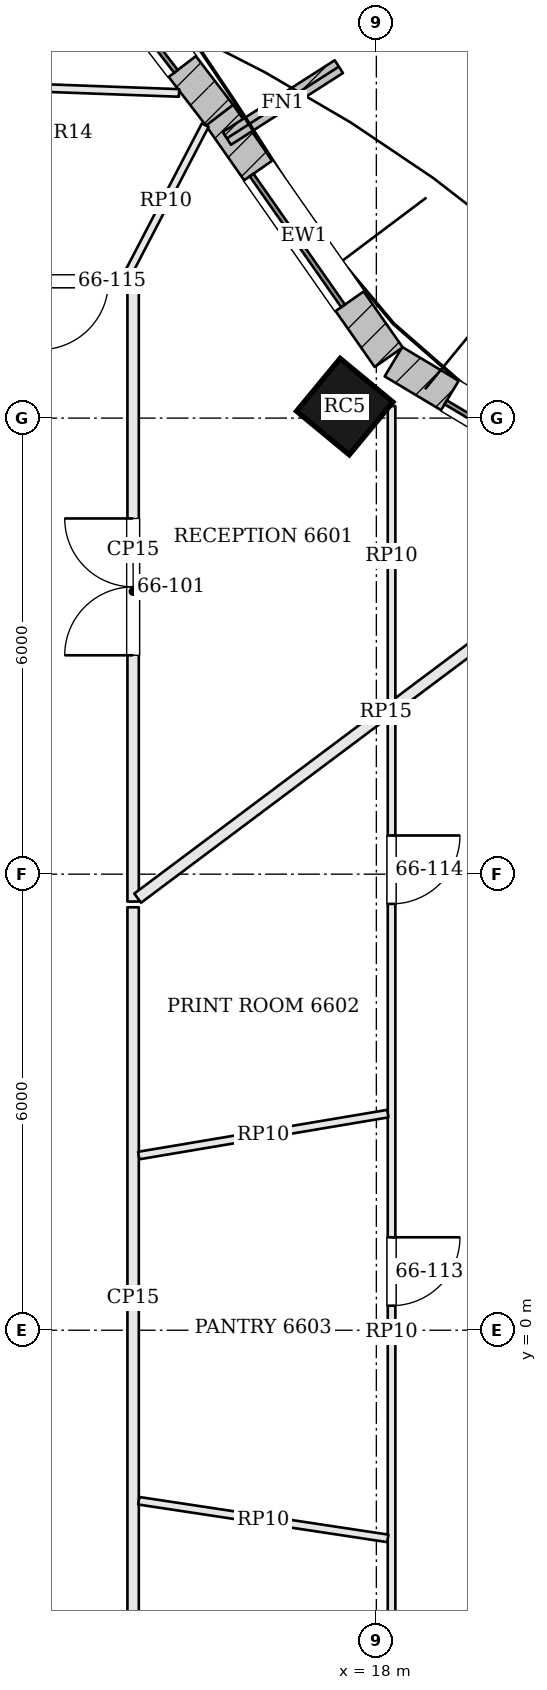
"""IFC4 building model, lengths in metres.
Left out: names, types, materials, properties, quantities, classifications, styles, units other than length and angle.
Written with IfcOpenShell. Run it as: python <this file> out.ifc"""

import sys

from ifc_helpers import new_model, si_unit, direction, frame, frame_2d, origin, origin_2d, place, context, subcontext, project, spatial, rectangle, extrude, element, fill, save


model = new_model("IFC4")
c1 = context("Model", 3, precision=1e-05, world=origin(), true_north=direction((0.0, 1.0)))
c2 = subcontext(c1, "Body", "Model", "MODEL_VIEW")
j1 = project(units=[si_unit("LENGTHUNIT", "METRE"), si_unit("PLANEANGLEUNIT", "RADIAN")], contexts=[c1])
p1 = place(None, origin())
s1 = spatial("IfcSite", under=j1, at=p1, CompositionType="ELEMENT")
p2 = place(p1, origin())
s2 = spatial("IfcBuilding", under=s1, at=p2, CompositionType="ELEMENT")
p3 = place(p2, frame((0.0, 0.0, 268.8)))
s3 = spatial("IfcBuildingStorey", under=s2, at=p3, CompositionType="ELEMENT", Elevation=268.8)
p4 = place(p3, frame((17.584, 12.151, -0.7), z_axis=(0.0, 0.0, 1.0), x_axis=(-0.770679191336, 0.637223339216, 0.0)))
e1 = element("IfcColumn", 1, at=p4, inside=s3, PredefinedType="COLUMN", context=c2, shape_type="SweptSolid", body=[
    extrude(rectangle(XDim=0.9, YDim=0.9, at=origin_2d()), origin(), (0.0, 0.0, 1.0), 4.6),
])
p5 = place(p3, frame((21.51, 10.774, 0.0), z_axis=(0.0, 0.0, 1.0), x_axis=(-0.857920147813, 0.513783047576, 0.0)))
e2 = element("IfcWall", 2, at=p5, inside=s3, PredefinedType="SOLIDWALL", context=c2, shape_type="SweptSolid", body=[
    extrude(rectangle(XDim=3.83, YDim=0.45, at=frame_2d((1.915, 0.0))), origin(), (0.0, 0.0, 1.0), 3.7),
])
p6 = place(p5, frame((0.865, 0.0, 0.9)))
e3 = element("IfcOpeningElement", 3, at=p6, cuts=e2, PredefinedType="OPENING", context=c2, shape_type="SweptSolid", body=[
    extrude(rectangle(XDim=2.1, YDim=2.3, at=frame_2d((1.05, 1.15))), frame((0.0, 0.235, 0.0), z_axis=(0.0, -1.0, 0.0), x_axis=(1.0, 0.0, 0.0)), (0.0, 0.0, 1.0), 0.47),
])
p7 = place(p3, frame((18.163, 12.801, 0.0), z_axis=(0.0, 0.0, 1.0), x_axis=(-0.57296578596, 0.819579287269, 0.0)))
e4 = element("IfcWall", 4, at=p7, inside=s3, PredefinedType="SOLIDWALL", context=c2, shape_type="SweptSolid", body=[
    extrude(rectangle(XDim=3.895, YDim=0.45, at=frame_2d((1.947, 0.0))), origin(), (0.0, 0.0, 1.0), 3.7),
])
p8 = place(p7, frame((0.897, 0.0, 0.9)))
e5 = element("IfcOpeningElement", 5, at=p8, cuts=e4, PredefinedType="OPENING", context=c2, shape_type="SweptSolid", body=[
    extrude(rectangle(XDim=2.1, YDim=2.3, at=frame_2d((1.05, 1.15))), frame((0.0, 0.235, 0.0), z_axis=(0.0, -1.0, 0.0), x_axis=(1.0, 0.0, 0.0)), (0.0, 0.0, 1.0), 0.47),
])
p9 = place(p3, frame((15.937, 15.985, 0.0), z_axis=(0.0, 0.0, 1.0), x_axis=(-0.60824792446, 0.793747102288, 0.0)))
e6 = element("IfcWall", 6, at=p9, inside=s3, PredefinedType="SOLIDWALL", context=c2, shape_type="SweptSolid", body=[
    extrude(rectangle(XDim=3.713, YDim=0.45, at=frame_2d((1.856, 0.0))), origin(), (0.0, 0.0, 1.0), 3.7),
])
p10 = place(p9, frame((0.806, 0.0, 0.9)))
e7 = element("IfcOpeningElement", 7, at=p10, cuts=e6, PredefinedType="OPENING", context=c2, shape_type="SweptSolid", body=[
    extrude(rectangle(XDim=2.1, YDim=2.3, at=frame_2d((1.05, 1.15))), frame((0.0, 0.235, 0.0), z_axis=(0.0, -1.0, 0.0), x_axis=(1.0, 0.0, 0.0)), (0.0, 0.0, 1.0), 0.47),
])
p11 = place(p3, frame((16.033, 15.68, 0.0), z_axis=(0.0, 0.0, 1.0), x_axis=(0.842083858075, 0.539346619503, 0.0)))
e8 = element("IfcWall", 8, at=p11, inside=s3, PredefinedType="SOLIDWALL", context=c2, shape_type="SweptSolid", body=[
    extrude(rectangle(XDim=1.75, YDim=0.2, at=frame_2d((0.875, 0.0))), origin(), (0.0, 0.0, 1.0), 3.7),
])
p12 = place(p3, frame((14.8, 5.64, 0.0), z_axis=(0.0, 0.0, 1.0), x_axis=(0.0, 1.0, 0.0)))
e9 = element("IfcWall", 9, at=p12, inside=s3, PredefinedType="PARTITIONING", context=c2, shape_type="SweptSolid", body=[
    extrude(rectangle(XDim=8.16, YDim=0.15, at=frame_2d((4.08, 0.0))), origin(), (0.0, 0.0, 1.0), 3.198),
])
p13 = place(p12, frame((3.24, 0.0, 0.0)))
e10 = element("IfcOpeningElement", 10, at=p13, cuts=e9, PredefinedType="OPENING", context=c2, shape_type="SweptSolid", body=[
    extrude(rectangle(XDim=1.8, YDim=2.1, at=frame_2d((0.9, 1.05))), frame((0.0, 0.085, 0.0), z_axis=(0.0, -1.0, 0.0), x_axis=(1.0, 0.0, 0.0)), (0.0, 0.0, 1.0), 0.17),
])
p14 = place(p3, frame((14.725, 13.8, 0.0), z_axis=(0.0, 0.0, 1.0), x_axis=(-1.0, 0.0, 0.0)))
e11 = element("IfcWall", 11, at=p14, inside=s3, PredefinedType="PARTITIONING", context=c2, shape_type="SweptSolid", body=[
    extrude(rectangle(XDim=23.627, YDim=0.15, at=frame_2d((11.813, 0.0))), origin(), (0.0, 0.0, 1.0), 3.198),
])
p15 = place(p14, frame((3.2, 0.0, 0.0)))
e12 = element("IfcOpeningElement", 12, at=p15, cuts=e11, PredefinedType="OPENING", context=c2, shape_type="SweptSolid", body=[
    extrude(rectangle(XDim=1.0, YDim=2.4, at=frame_2d((0.5, 1.2))), frame((0.0, 0.085, 0.0), z_axis=(0.0, -1.0, 0.0), x_axis=(1.0, 0.0, 0.0)), (0.0, 0.0, 1.0), 0.17),
])
p16 = place(p14, frame((5.414, 0.0, 0.0)))
e13 = element("IfcOpeningElement", 13, at=p16, cuts=e11, PredefinedType="OPENING", context=c2, shape_type="SweptSolid", body=[
    extrude(rectangle(XDim=1.0, YDim=2.4, at=frame_2d((0.5, 1.2))), frame((0.0, 0.085, 0.0), z_axis=(0.0, -1.0, 0.0), x_axis=(1.0, 0.0, 0.0)), (0.0, 0.0, 1.0), 0.17),
])
p17 = place(p14, frame((11.221, 0.0, 0.0)))
e14 = element("IfcOpeningElement", 14, at=p17, cuts=e11, PredefinedType="OPENING", context=c2, shape_type="SweptSolid", body=[
    extrude(rectangle(XDim=1.0, YDim=2.4, at=frame_2d((0.5, 1.2))), frame((0.0, 0.085, 0.0), z_axis=(0.0, -1.0, 0.0), x_axis=(1.0, 0.0, 0.0)), (0.0, 0.0, 1.0), 0.17),
])
p18 = place(p14, frame((0.25, 0.0, 0.0)))
e15 = element("IfcOpeningElement", 15, at=p18, cuts=e11, PredefinedType="OPENING", context=c2, shape_type="SweptSolid", body=[
    extrude(rectangle(XDim=0.9, YDim=2.1, at=frame_2d((0.45, 1.05))), frame((0.0, 0.085, 0.0), z_axis=(0.0, -1.0, 0.0), x_axis=(1.0, 0.0, 0.0)), (0.0, 0.0, 1.0), 0.17),
])
p19 = place(p14, frame((15.65, 0.0, 0.0)))
e16 = element("IfcOpeningElement", 16, at=p19, cuts=e11, PredefinedType="OPENING", context=c2, shape_type="SweptSolid", body=[
    extrude(rectangle(XDim=0.9, YDim=2.1, at=frame_2d((0.45, 1.05))), frame((0.0, 0.085, 0.0), z_axis=(0.0, -1.0, 0.0), x_axis=(1.0, 0.0, 0.0)), (0.0, 0.0, 1.0), 0.17),
])
p20 = place(p14, frame((20.05, 0.0, 0.0)))
e17 = element("IfcOpeningElement", 17, at=p20, cuts=e11, PredefinedType="OPENING", context=c2, shape_type="SweptSolid", body=[
    extrude(rectangle(XDim=1.0, YDim=2.1, at=frame_2d((0.5, 1.05))), frame((0.0, 0.085, 0.0), z_axis=(0.0, -1.0, 0.0), x_axis=(1.0, 0.0, 0.0)), (0.0, 0.0, 1.0), 0.17),
])
p21 = place(p3, frame((21.394, 10.577, 0.0), z_axis=(0.0, 0.0, 1.0), x_axis=(-0.800437661835, -0.599416007056, 0.0)))
e18 = element("IfcWall", 18, at=p21, inside=s3, PredefinedType="PARTITIONING", context=c2, shape_type="SweptSolid", body=[
    extrude(rectangle(XDim=8.163, YDim=0.15, at=frame_2d((4.081, 0.0))), origin(), (0.0, 0.0, 1.0), 3.184),
])
p22 = place(p3, frame((14.8, -4.725, 0.0), z_axis=(0.0, 0.0, 1.0), x_axis=(0.0, 1.0, 0.0)))
e19 = element("IfcWall", 19, at=p22, inside=s3, PredefinedType="PARTITIONING", context=c2, shape_type="SweptSolid", body=[
    extrude(rectangle(XDim=10.29, YDim=0.15, at=frame_2d((5.145, 0.0))), origin(), (0.0, 0.0, 1.0), 3.198),
])
p23 = place(p3, frame((8.274, 16.539, 0.0), z_axis=(0.0, 0.0, 1.0), x_axis=(0.99932696712, -0.03668259515, 0.0)))
e20 = element("IfcWall", 20, at=p23, inside=s3, PredefinedType="PARTITIONING", context=c2, shape_type="SweptSolid", body=[
    extrude(rectangle(XDim=7.135, YDim=0.1, at=frame_2d((3.567, 0.0))), origin(), (0.0, 0.0, 1.0), 3.184),
])
p24 = place(p3, frame((18.2, 12.158, 0.0), z_axis=(0.0, 0.0, 1.0), x_axis=(0.0, -1.0, 0.0)))
e21 = element("IfcWall", 21, at=p24, inside=s3, PredefinedType="PARTITIONING", context=c2, shape_type="SweptSolid", body=[
    extrude(rectangle(XDim=3.948, YDim=0.1, at=frame_2d((1.974, 0.0))), origin(), (0.0, 0.0, 1.0), 3.184),
])
p25 = place(p3, frame((14.715, 13.866, 0.0), z_axis=(0.0, 0.0, 1.0), x_axis=(0.461537979376, 0.887120450443, 0.0)))
e22 = element("IfcWall", 22, at=p25, inside=s3, PredefinedType="PARTITIONING", context=c2, shape_type="SweptSolid", body=[
    extrude(rectangle(XDim=2.241, YDim=0.1, at=frame_2d((1.12, 0.0))), origin(), (0.0, 0.0, 1.0), 3.184),
])
p26 = place(p3, frame((18.2, 8.161, 0.0), z_axis=(0.0, 0.0, 1.0), x_axis=(0.0, -1.0, 0.0)))
e23 = element("IfcWall", 23, at=p26, inside=s3, PredefinedType="PARTITIONING", context=c2, shape_type="SweptSolid", body=[
    extrude(rectangle(XDim=16.361, YDim=0.1, at=frame_2d((8.18, 0.0))), origin(), (0.0, 0.0, 1.0), 3.184),
])
p27 = place(p26, frame((6.938, 0.0, 0.0)))
e24 = element("IfcOpeningElement", 24, at=p27, cuts=e23, PredefinedType="OPENING", context=c2, shape_type="SweptSolid", body=[
    extrude(rectangle(XDim=0.9, YDim=2.1, at=frame_2d((0.45, 1.05))), frame((0.0, 0.06, 0.0), z_axis=(0.0, -1.0, 0.0), x_axis=(1.0, 0.0, 0.0)), (0.0, 0.0, 1.0), 0.12),
])
p28 = place(p26, frame((1.652, 0.0, 0.0)))
e25 = element("IfcOpeningElement", 25, at=p28, cuts=e23, PredefinedType="OPENING", context=c2, shape_type="SweptSolid", body=[
    extrude(rectangle(XDim=0.9, YDim=2.1, at=frame_2d((0.45, 1.05))), frame((0.0, 0.06, 0.0), z_axis=(0.0, -1.0, 0.0), x_axis=(1.0, 0.0, 0.0)), (0.0, 0.0, 1.0), 0.12),
])
p29 = place(p3, frame((14.874, -2.243, 0.0), z_axis=(0.0, 0.0, 1.0), x_axis=(0.988784515255, -0.149349196157, 0.0)))
e26 = element("IfcWall", 26, at=p29, inside=s3, PredefinedType="PARTITIONING", context=c2, shape_type="SweptSolid", body=[
    extrude(rectangle(XDim=3.313, YDim=0.1, at=frame_2d((1.657, 0.0))), origin(), (0.0, 0.0, 1.0), 3.184),
])
p30 = place(p3, frame((14.874, 2.298, 0.0), z_axis=(0.0, 0.0, 1.0), x_axis=(0.986140556788, 0.165912031684, 0.0)))
e27 = element("IfcWall", 27, at=p30, inside=s3, PredefinedType="PARTITIONING", context=c2, shape_type="SweptSolid", body=[
    extrude(rectangle(XDim=3.323, YDim=0.1, at=frame_2d((1.661, 0.0))), origin(), (0.0, 0.0, 1.0), 3.184),
])
p31 = place(p6, origin())
e28 = element("IfcWindow", 28, at=p31, inside=s3, PartitioningType="SINGLE_PANEL", PredefinedType="WINDOW", context=c2, shape_type="SweptSolid", body=[
    extrude(rectangle(XDim=2.1, YDim=2.3, at=frame_2d((1.05, 1.15))), frame((0.0, 0.135, 0.0), z_axis=(0.0, -1.0, 0.0), x_axis=(1.0, 0.0, 0.0)), (0.0, 0.0, 1.0), 0.06),
])
fill(e3, e28)
p32 = place(p8, origin())
e29 = element("IfcWindow", 29, at=p32, inside=s3, PartitioningType="SINGLE_PANEL", PredefinedType="WINDOW", context=c2, shape_type="SweptSolid", body=[
    extrude(rectangle(XDim=2.1, YDim=2.3, at=frame_2d((1.05, 1.15))), frame((0.0, 0.135, 0.0), z_axis=(0.0, -1.0, 0.0), x_axis=(1.0, 0.0, 0.0)), (0.0, 0.0, 1.0), 0.06),
])
fill(e5, e29)
p33 = place(p10, origin())
e30 = element("IfcWindow", 30, at=p33, inside=s3, PartitioningType="SINGLE_PANEL", PredefinedType="WINDOW", context=c2, shape_type="SweptSolid", body=[
    extrude(rectangle(XDim=2.1, YDim=2.3, at=frame_2d((1.05, 1.15))), frame((0.0, 0.135, 0.0), z_axis=(0.0, -1.0, 0.0), x_axis=(1.0, 0.0, 0.0)), (0.0, 0.0, 1.0), 0.06),
])
fill(e7, e30)
p34 = place(p13, origin())
e31 = element("IfcDoor", 31, at=p34, inside=s3, OperationType="DOUBLE_DOOR_SINGLE_SWING", PredefinedType="DOOR", context=c2, shape_type="SweptSolid", body=[
    extrude(rectangle(XDim=1.8, YDim=2.1, at=frame_2d((0.9, 1.05))), frame((0.0, 0.025, 0.0), z_axis=(0.0, -1.0, 0.0), x_axis=(1.0, 0.0, 0.0)), (0.0, 0.0, 1.0), 0.05),
])
fill(e10, e31)
p35 = place(p27, origin())
e32 = element("IfcDoor", 32, at=p35, inside=s3, OperationType="SINGLE_SWING_LEFT", PredefinedType="DOOR", context=c2, shape_type="SweptSolid", body=[
    extrude(rectangle(XDim=0.9, YDim=2.1, at=frame_2d((0.45, 1.05))), frame((0.0, 0.025, 0.0), z_axis=(0.0, -1.0, 0.0), x_axis=(1.0, 0.0, 0.0)), (0.0, 0.0, 1.0), 0.05),
])
fill(e24, e32)
p36 = place(p28, origin())
e33 = element("IfcDoor", 33, at=p36, inside=s3, OperationType="SINGLE_SWING_LEFT", PredefinedType="DOOR", context=c2, shape_type="SweptSolid", body=[
    extrude(rectangle(XDim=0.9, YDim=2.1, at=frame_2d((0.45, 1.05))), frame((0.0, 0.025, 0.0), z_axis=(0.0, -1.0, 0.0), x_axis=(1.0, 0.0, 0.0)), (0.0, 0.0, 1.0), 0.05),
])
fill(e25, e33)
p37 = place(p18, origin())
e34 = element("IfcDoor", 34, at=p37, inside=s3, OperationType="SINGLE_SWING_RIGHT", PredefinedType="DOOR", context=c2, shape_type="SweptSolid", body=[
    extrude(rectangle(XDim=0.9, YDim=2.1, at=frame_2d((0.45, 1.05))), frame((0.0, 0.025, 0.0), z_axis=(0.0, -1.0, 0.0), x_axis=(1.0, 0.0, 0.0)), (0.0, 0.0, 1.0), 0.05),
])
fill(e15, e34)
save(model, sys.argv[1])
